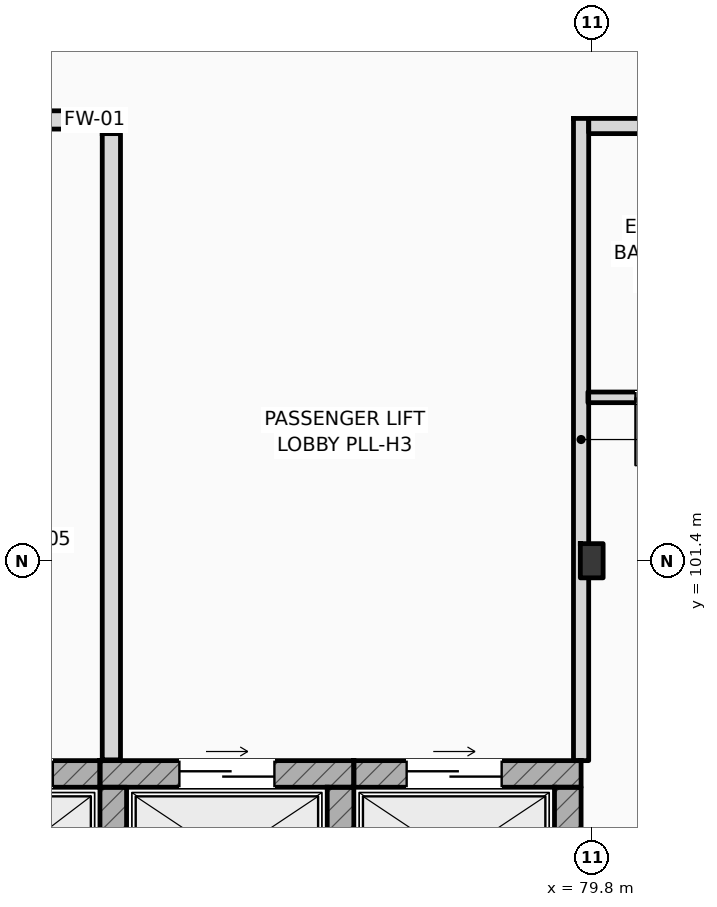
"""IFC4 building model, lengths in metres.
Left out: names, types, materials, properties, quantities, classifications, styles, units other than length and angle.
Written with IfcOpenShell. Run it as: python <this file> out.ifc"""

import sys

from ifc_helpers import new_model, si_unit, direction, frame, frame_2d, origin, origin_2d, place, context, subcontext, project, spatial, rectangle, i_section, extrude, element, fill, save


model = new_model("IFC4")
c1 = context("Model", 3, precision=1e-05, world=origin(), true_north=direction((0.0, 1.0)))
c2 = subcontext(c1, "Body", "Model", "MODEL_VIEW")
j1 = project(units=[si_unit("LENGTHUNIT", "METRE"), si_unit("PLANEANGLEUNIT", "RADIAN")], contexts=[c1])
p1 = place(None, origin())
s1 = spatial("IfcSite", under=j1, at=p1, CompositionType="ELEMENT")
p2 = place(p1, origin())
s2 = spatial("IfcBuilding", under=s1, at=p2, CompositionType="ELEMENT")
p3 = place(p2, frame((0.0, 0.0, 24.6)))
s3 = spatial("IfcBuildingStorey", under=s2, at=p3, CompositionType="ELEMENT", Elevation=24.6)
p4 = place(p3, frame((79.8, 101.4, 0.0), z_axis=(0.0, 0.0, 1.0), x_axis=(1.0, 0.0, 0.0)))
e1 = element("IfcColumn", 1, at=p4, inside=s3, PredefinedType="COLUMN", context=c2, shape_type="SweptSolid", body=[
    extrude(i_section(OverallWidth=0.3, OverallDepth=0.45, WebThickness=0.014, FlangeThickness=0.026, FilletRadius=0.027, at=origin_2d()), origin(), (0.0, 0.0, 1.0), 3.6),
])
p5 = place(p3, frame((70.64, 98.595, 0.0), z_axis=(0.0, 0.0, 1.0), x_axis=(1.0, 0.0, 0.0)))
e2 = element("IfcWall", 2, at=p5, inside=s3, PredefinedType="SHEAR", context=c2, shape_type="SweptSolid", body=[
    extrude(rectangle(XDim=2.69, YDim=0.35, at=frame_2d((1.345, 0.0))), origin(), (0.0, 0.0, 1.0), 3.34),
])
p6 = place(p5, frame((0.97, 0.0, 0.0)))
e3 = element("IfcOpeningElement", 3, at=p6, cuts=e2, PredefinedType="OPENING", context=c2, shape_type="SweptSolid", body=[
    extrude(rectangle(XDim=1.1, YDim=2.2, at=frame_2d((0.55, 1.1))), frame((0.0, 0.185, 0.0), z_axis=(0.0, -1.0, 0.0), x_axis=(1.0, 0.0, 0.0)), (0.0, 0.0, 1.0), 0.37),
])
p7 = place(p3, frame((73.33, 98.595, 0.0), z_axis=(0.0, 0.0, 1.0), x_axis=(1.0, 0.0, 0.0)))
e4 = element("IfcWall", 4, at=p7, inside=s3, PredefinedType="SHEAR", context=c2, shape_type="SweptSolid", body=[
    extrude(rectangle(XDim=3.34, YDim=0.35, at=frame_2d((1.67, 0.0))), origin(), (0.0, 0.0, 1.0), 3.34),
])
p8 = place(p7, frame((1.045, 0.0, 0.0)))
e5 = element("IfcOpeningElement", 5, at=p8, cuts=e4, PredefinedType="OPENING", context=c2, shape_type="SweptSolid", body=[
    extrude(rectangle(XDim=1.25, YDim=2.25, at=frame_2d((0.625, 1.125))), frame((0.0, 0.185, 0.0), z_axis=(0.0, -1.0, 0.0), x_axis=(1.0, 0.0, 0.0)), (0.0, 0.0, 1.0), 0.37),
])
for number, where, z_axis, x_axis in (
    (6, (73.505, 96.58, 0.0), (0.0, 0.0, 1.0), (0.0, 1.0, 0.0)),
    (7, (76.495, 96.58, 0.0), (0.0, 0.0, 1.0), (0.0, 1.0, 0.0)),
):
    element("IfcWall", number, at=place(p3, frame(where, z_axis=z_axis, x_axis=x_axis)), inside=s3, PredefinedType="SHEAR", context=c2, shape_type="SweptSolid", body=[
        extrude(rectangle(XDim=1.84, YDim=0.35, at=frame_2d((0.92, 0.0))), origin(), (0.0, 0.0, 1.0), 3.34),
    ])
p9 = place(p3, frame((76.67, 98.595, 0.0), z_axis=(0.0, 0.0, 1.0), x_axis=(1.0, 0.0, 0.0)))
e8 = element("IfcWall", 8, at=p9, inside=s3, PredefinedType="SHEAR", context=c2, shape_type="SweptSolid", body=[
    extrude(rectangle(XDim=2.99, YDim=0.35, at=frame_2d((1.495, 0.0))), origin(), (0.0, 0.0, 1.0), 3.34),
])
p10 = place(p9, frame((0.695, 0.0, 0.0)))
e9 = element("IfcOpeningElement", 9, at=p10, cuts=e8, PredefinedType="OPENING", context=c2, shape_type="SweptSolid", body=[
    extrude(rectangle(XDim=1.25, YDim=2.25, at=frame_2d((0.625, 1.125))), frame((0.0, 0.185, 0.0), z_axis=(0.0, -1.0, 0.0), x_axis=(1.0, 0.0, 0.0)), (0.0, 0.0, 1.0), 0.37),
])
p11 = place(p3, frame((79.485, 96.58, 0.0), z_axis=(0.0, 0.0, 1.0), x_axis=(0.0, 1.0, 0.0)))
e10 = element("IfcWall", 10, at=p11, inside=s3, PredefinedType="SHEAR", context=c2, shape_type="SweptSolid", body=[
    extrude(rectangle(XDim=1.84, YDim=0.35, at=frame_2d((0.92, 0.0))), origin(), (0.0, 0.0, 1.0), 2.93),
])
p12 = place(p3, frame((73.48, 98.78, 0.0), z_axis=(0.0, 0.0, 1.0), x_axis=(0.0, 1.0, 0.0)))
e11 = element("IfcWall", 11, at=p12, inside=s3, PredefinedType="STANDARD", context=c2, shape_type="SweptSolid", body=[
    extrude(rectangle(XDim=8.24, YDim=0.24, at=frame_2d((4.12, 0.0))), origin(), (0.0, 0.0, 1.0), 3.34),
])
p13 = place(p3, frame((69.56, 107.2, 0.0), z_axis=(0.0, 0.0, 1.0), x_axis=(1.0, 0.0, 0.0)))
e12 = element("IfcWall", 12, at=p13, inside=s3, PredefinedType="STANDARD", context=c2, shape_type="SweptSolid", body=[
    extrude(rectangle(XDim=4.1, YDim=0.24, at=frame_2d((2.05, 0.0))), origin(), (0.0, 0.0, 1.0), 3.34),
])
p14 = place(p13, frame((1.3, 0.0, 0.0)))
e13 = element("IfcOpeningElement", 13, at=p14, cuts=e12, PredefinedType="OPENING", context=c2, shape_type="SweptSolid", body=[
    extrude(rectangle(XDim=1.1, YDim=2.2, at=frame_2d((0.55, 1.1))), frame((0.0, 0.13, 0.0), z_axis=(0.0, -1.0, 0.0), x_axis=(1.0, 0.0, 0.0)), (0.0, 0.0, 1.0), 0.26),
])
p15 = place(p3, frame((79.76, 107.12, 0.0), z_axis=(0.0, 0.0, 1.0), x_axis=(1.0, 0.0, 0.0)))
e14 = element("IfcWall", 14, at=p15, inside=s3, PredefinedType="PARTITIONING", context=c2, shape_type="SweptSolid", body=[
    extrude(rectangle(XDim=40.1, YDim=0.2, at=frame_2d((20.05, 0.0))), origin(), (0.0, 0.0, 1.0), 3.34),
])
p16 = place(p15, frame((2.65, 0.0, 0.0)))
e15 = element("IfcOpeningElement", 15, at=p16, cuts=e14, PredefinedType="OPENING", context=c2, shape_type="SweptSolid", body=[
    extrude(rectangle(XDim=0.96, YDim=2.2, at=frame_2d((0.48, 1.1))), frame((0.0, 0.11, 0.0), z_axis=(0.0, -1.0, 0.0), x_axis=(1.0, 0.0, 0.0)), (0.0, 0.0, 1.0), 0.22),
])
p17 = place(p15, frame((4.448, 0.0, 0.0)))
e16 = element("IfcOpeningElement", 16, at=p17, cuts=e14, PredefinedType="OPENING", context=c2, shape_type="SweptSolid", body=[
    extrude(rectangle(XDim=0.96, YDim=2.2, at=frame_2d((0.48, 1.1))), frame((0.0, 0.11, 0.0), z_axis=(0.0, -1.0, 0.0), x_axis=(1.0, 0.0, 0.0)), (0.0, 0.0, 1.0), 0.22),
])
p18 = place(p15, frame((10.583, 0.0, 0.0)))
e17 = element("IfcOpeningElement", 17, at=p18, cuts=e14, PredefinedType="OPENING", context=c2, shape_type="SweptSolid", body=[
    extrude(rectangle(XDim=0.96, YDim=2.2, at=frame_2d((0.48, 1.1))), frame((0.0, 0.11, 0.0), z_axis=(0.0, -1.0, 0.0), x_axis=(1.0, 0.0, 0.0)), (0.0, 0.0, 1.0), 0.22),
])
p19 = place(p15, frame((12.418, 0.0, 0.0)))
e18 = element("IfcOpeningElement", 18, at=p19, cuts=e14, PredefinedType="OPENING", context=c2, shape_type="SweptSolid", body=[
    extrude(rectangle(XDim=0.96, YDim=2.2, at=frame_2d((0.48, 1.1))), frame((0.0, 0.11, 0.0), z_axis=(0.0, -1.0, 0.0), x_axis=(1.0, 0.0, 0.0)), (0.0, 0.0, 1.0), 0.22),
])
p20 = place(p15, frame((18.553, 0.0, 0.0)))
e19 = element("IfcOpeningElement", 19, at=p20, cuts=e14, PredefinedType="OPENING", context=c2, shape_type="SweptSolid", body=[
    extrude(rectangle(XDim=0.96, YDim=2.2, at=frame_2d((0.48, 1.1))), frame((0.0, 0.11, 0.0), z_axis=(0.0, -1.0, 0.0), x_axis=(1.0, 0.0, 0.0)), (0.0, 0.0, 1.0), 0.22),
])
p21 = place(p15, frame((20.388, 0.0, 0.0)))
e20 = element("IfcOpeningElement", 20, at=p21, cuts=e14, PredefinedType="OPENING", context=c2, shape_type="SweptSolid", body=[
    extrude(rectangle(XDim=0.96, YDim=2.2, at=frame_2d((0.48, 1.1))), frame((0.0, 0.11, 0.0), z_axis=(0.0, -1.0, 0.0), x_axis=(1.0, 0.0, 0.0)), (0.0, 0.0, 1.0), 0.22),
])
p22 = place(p15, frame((26.523, 0.0, 0.0)))
e21 = element("IfcOpeningElement", 21, at=p22, cuts=e14, PredefinedType="OPENING", context=c2, shape_type="SweptSolid", body=[
    extrude(rectangle(XDim=0.96, YDim=2.2, at=frame_2d((0.48, 1.1))), frame((0.0, 0.11, 0.0), z_axis=(0.0, -1.0, 0.0), x_axis=(1.0, 0.0, 0.0)), (0.0, 0.0, 1.0), 0.22),
])
p23 = place(p15, frame((28.358, 0.0, 0.0)))
e22 = element("IfcOpeningElement", 22, at=p23, cuts=e14, PredefinedType="OPENING", context=c2, shape_type="SweptSolid", body=[
    extrude(rectangle(XDim=0.96, YDim=2.2, at=frame_2d((0.48, 1.1))), frame((0.0, 0.11, 0.0), z_axis=(0.0, -1.0, 0.0), x_axis=(1.0, 0.0, 0.0)), (0.0, 0.0, 1.0), 0.22),
])
p24 = place(p15, frame((34.493, 0.0, 0.0)))
e23 = element("IfcOpeningElement", 23, at=p24, cuts=e14, PredefinedType="OPENING", context=c2, shape_type="SweptSolid", body=[
    extrude(rectangle(XDim=0.96, YDim=2.2, at=frame_2d((0.48, 1.1))), frame((0.0, 0.11, 0.0), z_axis=(0.0, -1.0, 0.0), x_axis=(1.0, 0.0, 0.0)), (0.0, 0.0, 1.0), 0.22),
])
p25 = place(p15, frame((36.364, 0.0, 0.0)))
e24 = element("IfcOpeningElement", 24, at=p25, cuts=e14, PredefinedType="OPENING", context=c2, shape_type="SweptSolid", body=[
    extrude(rectangle(XDim=0.96, YDim=2.2, at=frame_2d((0.48, 1.1))), frame((0.0, 0.11, 0.0), z_axis=(0.0, -1.0, 0.0), x_axis=(1.0, 0.0, 0.0)), (0.0, 0.0, 1.0), 0.22),
])
p26 = place(p3, frame((79.66, 98.77, 0.0), z_axis=(0.0, 0.0, 1.0), x_axis=(0.0, 1.0, 0.0)))
e25 = element("IfcWall", 25, at=p26, inside=s3, PredefinedType="PARTITIONING", context=c2, shape_type="SweptSolid", body=[
    extrude(rectangle(XDim=8.45, YDim=0.2, at=frame_2d((4.225, 0.0))), origin(), (0.0, 0.0, 1.0), 2.93),
])
p27 = place(p3, frame((79.75, 103.55, 0.0), z_axis=(0.0, 0.0, 1.0), x_axis=(1.0, 0.0, 0.0)))
e26 = element("IfcWall", 26, at=p27, inside=s3, PredefinedType="PARTITIONING", context=c2, shape_type="SweptSolid", body=[
    extrude(rectangle(XDim=2.15, YDim=0.14, at=frame_2d((1.075, 0.0))), origin(), (0.0, 0.0, 1.0), 3.34),
])
p28 = place(p27, frame((0.625, 0.0, 0.0)))
e27 = element("IfcOpeningElement", 27, at=p28, cuts=e26, PredefinedType="OPENING", context=c2, shape_type="SweptSolid", body=[
    extrude(rectangle(XDim=0.9, YDim=2.1, at=frame_2d((0.45, 1.05))), frame((0.0, 0.08, 0.0), z_axis=(0.0, -1.0, 0.0), x_axis=(1.0, 0.0, 0.0)), (0.0, 0.0, 1.0), 0.16),
])
p29 = place(p6, origin())
e28 = element("IfcDoor", 28, at=p29, inside=s3, OperationType="SLIDING_TO_LEFT", PredefinedType="DOOR", context=c2, shape_type="SweptSolid", body=[
    extrude(rectangle(XDim=1.1, YDim=2.2, at=frame_2d((0.55, 1.1))), frame((0.0, 0.025, 0.0), z_axis=(0.0, -1.0, 0.0), x_axis=(1.0, 0.0, 0.0)), (0.0, 0.0, 1.0), 0.05),
])
fill(e3, e28)
p30 = place(p8, origin())
e29 = element("IfcDoor", 29, at=p30, inside=s3, OperationType="SLIDING_TO_LEFT", PredefinedType="DOOR", context=c2, shape_type="SweptSolid", body=[
    extrude(rectangle(XDim=1.25, YDim=2.25, at=frame_2d((0.625, 1.125))), frame((0.0, 0.025, 0.0), z_axis=(0.0, -1.0, 0.0), x_axis=(1.0, 0.0, 0.0)), (0.0, 0.0, 1.0), 0.05),
])
fill(e5, e29)
p31 = place(p10, origin())
e30 = element("IfcDoor", 30, at=p31, inside=s3, OperationType="SLIDING_TO_LEFT", PredefinedType="DOOR", context=c2, shape_type="SweptSolid", body=[
    extrude(rectangle(XDim=1.25, YDim=2.25, at=frame_2d((0.625, 1.125))), frame((0.0, 0.025, 0.0), z_axis=(0.0, -1.0, 0.0), x_axis=(1.0, 0.0, 0.0)), (0.0, 0.0, 1.0), 0.05),
])
fill(e9, e30)
p32 = place(p28, frame((0.9, 0.0, 0.0), z_axis=(0.0, 0.0, 1.0), x_axis=(-1.0, 0.0, 0.0)))
e31 = element("IfcDoor", 31, at=p32, inside=s3, OperationType="SINGLE_SWING_LEFT", PredefinedType="DOOR", context=c2, shape_type="SweptSolid", body=[
    extrude(rectangle(XDim=0.9, YDim=2.1, at=frame_2d((0.45, 1.05))), frame((0.0, 0.025, 0.0), z_axis=(0.0, -1.0, 0.0), x_axis=(1.0, 0.0, 0.0)), (0.0, 0.0, 1.0), 0.05),
])
fill(e27, e31)
save(model, sys.argv[1])
